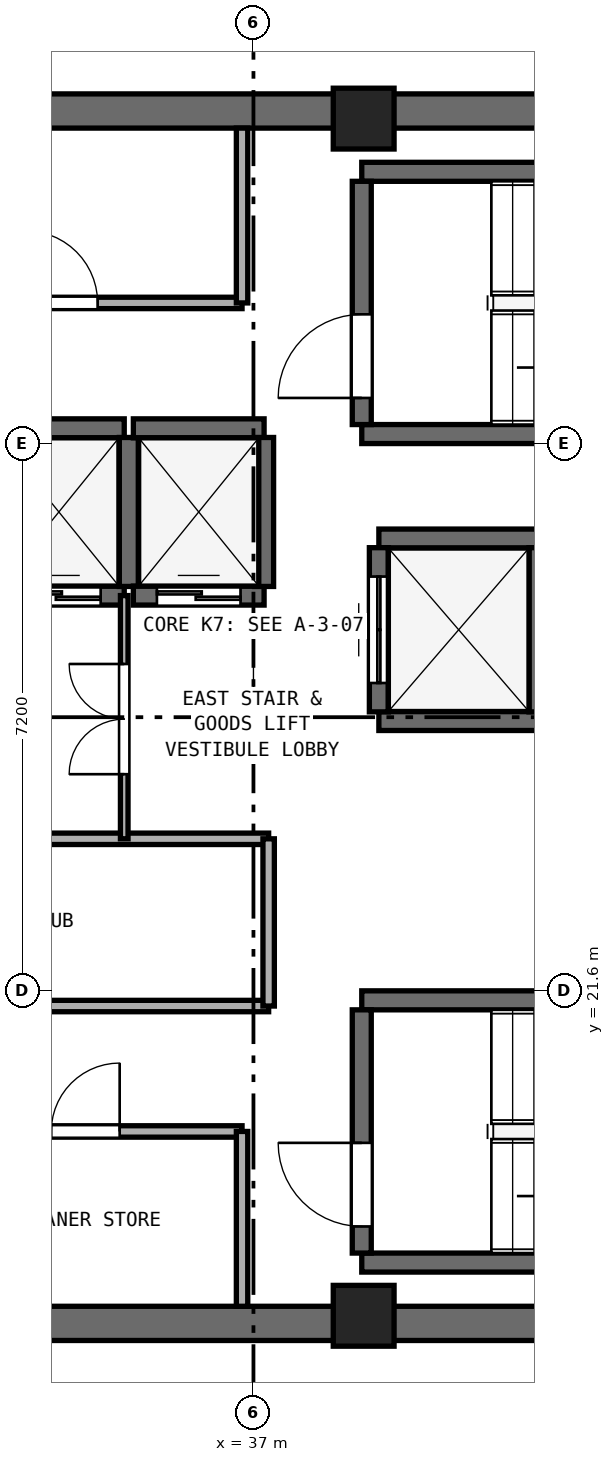
"""IFC4 building model, lengths in metres.
Left out: names, types, materials, properties, quantities, classifications, styles, units other than length and angle.
Written with IfcOpenShell. Run it as: python <this file> out.ifc"""

import sys

from ifc_helpers import new_model, si_unit, direction, frame, frame_2d, origin, origin_2d, place, context, subcontext, project, spatial, rectangle, extrude, element, fill, save


model = new_model("IFC4")
c1 = context("Model", 3, precision=1e-05, world=origin(), true_north=direction((0.0, 1.0)))
c2 = subcontext(c1, "Body", "Model", "MODEL_VIEW")
j1 = project(units=[si_unit("LENGTHUNIT", "METRE"), si_unit("PLANEANGLEUNIT", "RADIAN")], contexts=[c1])
p1 = place(None, origin())
s1 = spatial("IfcSite", under=j1, at=p1, CompositionType="ELEMENT")
p2 = place(p1, origin())
s2 = spatial("IfcBuilding", under=s1, at=p2, CompositionType="ELEMENT")
p3 = place(p2, frame((0.0, 0.0, 263.0)))
s3 = spatial("IfcBuildingStorey", under=s2, at=p3, CompositionType="ELEMENT", Elevation=263.0)
for number, where, z_axis, x_axis in (
    (1, (25.4, 17.225, 0.0), (0.0, 0.0, 1.0), (1.0, 0.0, 0.0)),
    (2, (25.4, 33.175, 0.0), (0.0, 0.0, 1.0), (1.0, 0.0, 0.0)),
):
    element("IfcWall", number, at=place(p3, frame(where, z_axis=z_axis, x_axis=x_axis)), inside=s3, PredefinedType="SHEAR", context=c2, shape_type="SweptSolid", body=[
        extrude(rectangle(XDim=23.2, YDim=0.45, at=frame_2d((11.6, 0.0))), origin(), (0.0, 0.0, 1.0), 3.51),
    ])
for number, where, z_axis, x_axis in (
    (3, (38.45, 17.325, 0.0), (0.0, 0.0, 1.0), (1.0, 0.0, 0.0)),
    (4, (38.45, 33.075, 0.0), (0.0, 0.0, 1.0), (1.0, 0.0, 0.0)),
):
    element("IfcColumn", number, at=place(p3, frame(where, z_axis=z_axis, x_axis=x_axis)), inside=s3, PredefinedType="PILASTER", context=c2, shape_type="SweptSolid", body=[
        extrude(rectangle(XDim=0.8, YDim=0.8, at=origin_2d()), origin(), (0.0, 0.0, 1.0), 3.8),
    ])
for number, where, z_axis, x_axis in (
    (5, (38.425, 28.925, 0.0), (0.0, 0.0, 1.0), (1.0, 0.0, 0.0)),
    (6, (38.425, 32.375, 0.0), (0.0, 0.0, 1.0), (1.0, 0.0, 0.0)),
):
    element("IfcWall", number, at=place(p3, frame(where, z_axis=z_axis, x_axis=x_axis)), inside=s3, PredefinedType="SHEAR", context=c2, shape_type="SweptSolid", body=[
        extrude(rectangle(XDim=7.3, YDim=0.25, at=frame_2d((3.65, 0.0))), origin(), (0.0, 0.0, 1.0), 3.51),
    ])
p4 = place(p3, frame((38.425, 29.05, 0.0), z_axis=(0.0, 0.0, 1.0), x_axis=(0.0, 1.0, 0.0)))
e7 = element("IfcWall", 7, at=p4, inside=s3, PredefinedType="SHEAR", context=c2, shape_type="SweptSolid", body=[
    extrude(rectangle(XDim=3.2, YDim=0.25, at=frame_2d((1.6, 0.0))), origin(), (0.0, 0.0, 1.0), 3.51),
])
p5 = place(p4, frame((0.35, 0.0, 0.0)))
e8 = element("IfcOpeningElement", 8, at=p5, cuts=e7, PredefinedType="OPENING", context=c2, shape_type="SweptSolid", body=[
    extrude(rectangle(XDim=1.1, YDim=2.15, at=frame_2d((0.55, 1.075))), frame((0.0, 0.135, 0.0), z_axis=(0.0, -1.0, 0.0), x_axis=(1.0, 0.0, 0.0)), (0.0, 0.0, 1.0), 0.27),
])
for number, where, z_axis, x_axis in (
    (9, (38.425, 18.025, 0.0), (0.0, 0.0, 1.0), (1.0, 0.0, 0.0)),
    (10, (38.425, 21.475, 0.0), (0.0, 0.0, 1.0), (1.0, 0.0, 0.0)),
):
    element("IfcWall", number, at=place(p3, frame(where, z_axis=z_axis, x_axis=x_axis)), inside=s3, PredefinedType="SHEAR", context=c2, shape_type="SweptSolid", body=[
        extrude(rectangle(XDim=7.3, YDim=0.25, at=frame_2d((3.65, 0.0))), origin(), (0.0, 0.0, 1.0), 3.51),
    ])
p6 = place(p3, frame((38.425, 18.15, 0.0), z_axis=(0.0, 0.0, 1.0), x_axis=(0.0, 1.0, 0.0)))
e11 = element("IfcWall", 11, at=p6, inside=s3, PredefinedType="SHEAR", context=c2, shape_type="SweptSolid", body=[
    extrude(rectangle(XDim=3.2, YDim=0.25, at=frame_2d((1.6, 0.0))), origin(), (0.0, 0.0, 1.0), 3.51),
])
p7 = place(p6, frame((0.35, 0.0, 0.0)))
e12 = element("IfcOpeningElement", 12, at=p7, cuts=e11, PredefinedType="OPENING", context=c2, shape_type="SweptSolid", body=[
    extrude(rectangle(XDim=1.1, YDim=2.15, at=frame_2d((0.55, 1.075))), frame((0.0, 0.135, 0.0), z_axis=(0.0, -1.0, 0.0), x_axis=(1.0, 0.0, 0.0)), (0.0, 0.0, 1.0), 0.27),
])
p8 = place(p3, frame((33.58, 26.8, 0.0), z_axis=(0.0, 0.0, 1.0), x_axis=(1.0, 0.0, 0.0)))
e13 = element("IfcWall", 13, at=p8, inside=s3, PredefinedType="SHEAR", context=c2, shape_type="SweptSolid", body=[
    extrude(rectangle(XDim=1.72, YDim=0.25, at=frame_2d((0.86, 0.0))), origin(), (0.0, 0.0, 1.0), 3.51),
])
p9 = place(p8, frame((0.31, 0.0, 0.0)))
e14 = element("IfcOpeningElement", 14, at=p9, cuts=e13, PredefinedType="OPENING", context=c2, shape_type="SweptSolid", body=[
    extrude(rectangle(XDim=1.1, YDim=2.15, at=frame_2d((0.55, 1.075))), frame((0.0, 0.135, 0.0), z_axis=(0.0, -1.0, 0.0), x_axis=(1.0, 0.0, 0.0)), (0.0, 0.0, 1.0), 0.27),
])
p10 = place(p3, frame((33.58, 29.0, 0.0), z_axis=(0.0, 0.0, 1.0), x_axis=(1.0, 0.0, 0.0)))
e15 = element("IfcWall", 15, at=p10, inside=s3, PredefinedType="SHEAR", context=c2, shape_type="SweptSolid", body=[
    extrude(rectangle(XDim=1.72, YDim=0.25, at=frame_2d((0.86, 0.0))), origin(), (0.0, 0.0, 1.0), 3.51),
])
p11 = place(p3, frame((35.36, 26.92, 0.0), z_axis=(0.0, 0.0, 1.0), x_axis=(0.0, 1.0, 0.0)))
e16 = element("IfcWall", 16, at=p11, inside=s3, PredefinedType="SHEAR", context=c2, shape_type="SweptSolid", body=[
    extrude(rectangle(XDim=1.96, YDim=0.25, at=frame_2d((0.98, 0.0))), origin(), (0.0, 0.0, 1.0), 3.51),
])
p12 = place(p3, frame((35.42, 26.8, 0.0), z_axis=(0.0, 0.0, 1.0), x_axis=(1.0, 0.0, 0.0)))
e17 = element("IfcWall", 17, at=p12, inside=s3, PredefinedType="SHEAR", context=c2, shape_type="SweptSolid", body=[
    extrude(rectangle(XDim=1.72, YDim=0.25, at=frame_2d((0.86, 0.0))), origin(), (0.0, 0.0, 1.0), 3.51),
])
p13 = place(p12, frame((0.31, 0.0, 0.0)))
e18 = element("IfcOpeningElement", 18, at=p13, cuts=e17, PredefinedType="OPENING", context=c2, shape_type="SweptSolid", body=[
    extrude(rectangle(XDim=1.1, YDim=2.15, at=frame_2d((0.55, 1.075))), frame((0.0, 0.135, 0.0), z_axis=(0.0, -1.0, 0.0), x_axis=(1.0, 0.0, 0.0)), (0.0, 0.0, 1.0), 0.27),
])
p14 = place(p3, frame((35.42, 29.0, 0.0), z_axis=(0.0, 0.0, 1.0), x_axis=(1.0, 0.0, 0.0)))
e19 = element("IfcWall", 19, at=p14, inside=s3, PredefinedType="SHEAR", context=c2, shape_type="SweptSolid", body=[
    extrude(rectangle(XDim=1.72, YDim=0.25, at=frame_2d((0.86, 0.0))), origin(), (0.0, 0.0, 1.0), 3.51),
])
p15 = place(p3, frame((37.14, 26.92, 0.0), z_axis=(0.0, 0.0, 1.0), x_axis=(0.0, 1.0, 0.0)))
e20 = element("IfcWall", 20, at=p15, inside=s3, PredefinedType="SHEAR", context=c2, shape_type="SweptSolid", body=[
    extrude(rectangle(XDim=1.96, YDim=0.25, at=frame_2d((0.98, 0.0))), origin(), (0.0, 0.0, 1.0), 3.51),
])
for number, where, z_axis, x_axis in (
    (21, (38.65, 25.15, 0.0), (0.0, 0.0, 1.0), (1.0, 0.0, 0.0)),
    (22, (38.65, 27.55, 0.0), (0.0, 0.0, 1.0), (1.0, 0.0, 0.0)),
):
    element("IfcWall", number, at=place(p3, frame(where, z_axis=z_axis, x_axis=x_axis)), inside=s3, PredefinedType="SHEAR", context=c2, shape_type="SweptSolid", body=[
        extrude(rectangle(XDim=2.1, YDim=0.25, at=frame_2d((1.05, 0.0))), origin(), (0.0, 0.0, 1.0), 3.51),
    ])
p16 = place(p3, frame((38.65, 25.27, 0.0), z_axis=(0.0, 0.0, 1.0), x_axis=(0.0, 1.0, 0.0)))
e23 = element("IfcWall", 23, at=p16, inside=s3, PredefinedType="SHEAR", context=c2, shape_type="SweptSolid", body=[
    extrude(rectangle(XDim=2.16, YDim=0.25, at=frame_2d((1.08, 0.0))), origin(), (0.0, 0.0, 1.0), 3.51),
])
p17 = place(p16, frame((0.38, 0.0, 0.0)))
e24 = element("IfcOpeningElement", 24, at=p17, cuts=e23, PredefinedType="OPENING", context=c2, shape_type="SweptSolid", body=[
    extrude(rectangle(XDim=1.4, YDim=2.2, at=frame_2d((0.7, 1.1))), frame((0.0, 0.135, 0.0), z_axis=(0.0, -1.0, 0.0), x_axis=(1.0, 0.0, 0.0)), (0.0, 0.0, 1.0), 0.27),
])
p18 = place(p3, frame((40.75, 25.27, 0.0), z_axis=(0.0, 0.0, 1.0), x_axis=(0.0, 1.0, 0.0)))
e25 = element("IfcWall", 25, at=p18, inside=s3, PredefinedType="SHEAR", context=c2, shape_type="SweptSolid", body=[
    extrude(rectangle(XDim=2.16, YDim=0.25, at=frame_2d((1.08, 0.0))), origin(), (0.0, 0.0, 1.0), 3.51),
])
p19 = place(p3, frame((32.1, 30.65, 0.0), z_axis=(0.0, 0.0, 1.0), x_axis=(1.0, 0.0, 0.0)))
e26 = element("IfcWall", 26, at=p19, inside=s3, PredefinedType="PARTITIONING", context=c2, shape_type="SweptSolid", body=[
    extrude(rectangle(XDim=4.75, YDim=0.15, at=frame_2d((2.375, 0.0))), origin(), (0.0, 0.0, 1.0), 3.51),
])
p20 = place(p19, frame((1.9, 0.0, 0.0)))
e27 = element("IfcOpeningElement", 27, at=p20, cuts=e26, PredefinedType="OPENING", context=c2, shape_type="SweptSolid", body=[
    extrude(rectangle(XDim=0.95, YDim=2.1, at=frame_2d((0.475, 1.05))), frame((0.0, 0.085, 0.0), z_axis=(0.0, -1.0, 0.0), x_axis=(1.0, 0.0, 0.0)), (0.0, 0.0, 1.0), 0.17),
])
p21 = place(p3, frame((36.85, 30.65, 0.0), z_axis=(0.0, 0.0, 1.0), x_axis=(0.0, 1.0, 0.0)))
e28 = element("IfcWall", 28, at=p21, inside=s3, PredefinedType="PARTITIONING", context=c2, shape_type="SweptSolid", body=[
    extrude(rectangle(XDim=2.3, YDim=0.15, at=frame_2d((1.15, 0.0))), origin(), (0.0, 0.0, 1.0), 3.51),
])
p22 = place(p3, frame((32.73, 19.75, 0.0), z_axis=(0.0, 0.0, 1.0), x_axis=(1.0, 0.0, 0.0)))
e29 = element("IfcWall", 29, at=p22, inside=s3, PredefinedType="PARTITIONING", context=c2, shape_type="SweptSolid", body=[
    extrude(rectangle(XDim=4.12, YDim=0.15, at=frame_2d((2.06, 0.0))), origin(), (0.0, 0.0, 1.0), 3.51),
])
p23 = place(p22, frame((1.61, 0.0, 0.0)))
e30 = element("IfcOpeningElement", 30, at=p23, cuts=e29, PredefinedType="OPENING", context=c2, shape_type="SweptSolid", body=[
    extrude(rectangle(XDim=0.9, YDim=2.1, at=frame_2d((0.45, 1.05))), frame((0.0, 0.085, 0.0), z_axis=(0.0, -1.0, 0.0), x_axis=(1.0, 0.0, 0.0)), (0.0, 0.0, 1.0), 0.17),
])
p24 = place(p3, frame((36.85, 17.45, 0.0), z_axis=(0.0, 0.0, 1.0), x_axis=(0.0, 1.0, 0.0)))
e31 = element("IfcWall", 31, at=p24, inside=s3, PredefinedType="PARTITIONING", context=c2, shape_type="SweptSolid", body=[
    extrude(rectangle(XDim=2.3, YDim=0.15, at=frame_2d((1.15, 0.0))), origin(), (0.0, 0.0, 1.0), 3.51),
])
p25 = place(p3, frame((30.08, 21.4, 0.0), z_axis=(0.0, 0.0, 1.0), x_axis=(1.0, 0.0, 0.0)))
e32 = element("IfcWall", 32, at=p25, inside=s3, PredefinedType="PARTITIONING", context=c2, shape_type="SweptSolid", body=[
    extrude(rectangle(XDim=7.12, YDim=0.15, at=frame_2d((3.56, 0.0))), origin(), (0.0, 0.0, 1.0), 3.51),
])
p26 = place(p3, frame((30.08, 23.6, 0.0), z_axis=(0.0, 0.0, 1.0), x_axis=(1.0, 0.0, 0.0)))
e33 = element("IfcWall", 33, at=p26, inside=s3, PredefinedType="PARTITIONING", context=c2, shape_type="SweptSolid", body=[
    extrude(rectangle(XDim=7.12, YDim=0.15, at=frame_2d((3.56, 0.0))), origin(), (0.0, 0.0, 1.0), 3.51),
])
p27 = place(p26, frame((3.11, 0.0, 0.0)))
e34 = element("IfcOpeningElement", 34, at=p27, cuts=e33, PredefinedType="OPENING", context=c2, shape_type="SweptSolid", body=[
    extrude(rectangle(XDim=0.9, YDim=2.1, at=frame_2d((0.45, 1.05))), frame((0.0, 0.085, 0.0), z_axis=(0.0, -1.0, 0.0), x_axis=(1.0, 0.0, 0.0)), (0.0, 0.0, 1.0), 0.17),
])
p28 = place(p3, frame((37.2, 21.4, 0.0), z_axis=(0.0, 0.0, 1.0), x_axis=(0.0, 1.0, 0.0)))
e35 = element("IfcWall", 35, at=p28, inside=s3, PredefinedType="PARTITIONING", context=c2, shape_type="SweptSolid", body=[
    extrude(rectangle(XDim=2.2, YDim=0.15, at=frame_2d((1.1, 0.0))), origin(), (0.0, 0.0, 1.0), 3.51),
])
p29 = place(p3, frame((35.3, 23.6, 0.0), z_axis=(0.0, 0.0, 1.0), x_axis=(0.0, 1.0, 0.0)))
e36 = element("IfcWall", 36, at=p29, inside=s3, PredefinedType="PARTITIONING", context=c2, shape_type="SweptSolid", body=[
    extrude(rectangle(XDim=3.2, YDim=0.1, at=frame_2d((1.6, 0.0))), origin(), (0.0, 0.0, 1.0), 3.51),
])
p30 = place(p29, frame((0.85, 0.0, 0.0)))
e37 = element("IfcOpeningElement", 37, at=p30, cuts=e36, PredefinedType="OPENING", context=c2, shape_type="SweptSolid", body=[
    extrude(rectangle(XDim=1.45, YDim=2.12, at=frame_2d((0.725, 1.06))), frame((0.0, 0.06, 0.0), z_axis=(0.0, -1.0, 0.0), x_axis=(1.0, 0.0, 0.0)), (0.0, 0.0, 1.0), 0.12),
])
p31 = place(p5, origin())
e38 = element("IfcDoor", 38, at=p31, inside=s3, OperationType="SINGLE_SWING_LEFT", PredefinedType="DOOR", context=c2, shape_type="SweptSolid", body=[
    extrude(rectangle(XDim=1.1, YDim=2.15, at=frame_2d((0.55, 1.075))), frame((0.0, 0.025, 0.0), z_axis=(0.0, -1.0, 0.0), x_axis=(1.0, 0.0, 0.0)), (0.0, 0.0, 1.0), 0.05),
])
fill(e8, e38)
p32 = place(p7, origin())
e39 = element("IfcDoor", 39, at=p32, inside=s3, OperationType="SINGLE_SWING_RIGHT", PredefinedType="DOOR", context=c2, shape_type="SweptSolid", body=[
    extrude(rectangle(XDim=1.1, YDim=2.15, at=frame_2d((0.55, 1.075))), frame((0.0, 0.025, 0.0), z_axis=(0.0, -1.0, 0.0), x_axis=(1.0, 0.0, 0.0)), (0.0, 0.0, 1.0), 0.05),
])
fill(e12, e39)
p33 = place(p9, origin())
e40 = element("IfcDoor", 40, at=p33, inside=s3, OperationType="DOUBLE_DOOR_SLIDING", PredefinedType="DOOR", context=c2, shape_type="SweptSolid", body=[
    extrude(rectangle(XDim=1.1, YDim=2.15, at=frame_2d((0.55, 1.075))), frame((0.0, 0.025, 0.0), z_axis=(0.0, -1.0, 0.0), x_axis=(1.0, 0.0, 0.0)), (0.0, 0.0, 1.0), 0.05),
])
fill(e14, e40)
p34 = place(p13, origin())
e41 = element("IfcDoor", 41, at=p34, inside=s3, OperationType="DOUBLE_DOOR_SLIDING", PredefinedType="DOOR", context=c2, shape_type="SweptSolid", body=[
    extrude(rectangle(XDim=1.1, YDim=2.15, at=frame_2d((0.55, 1.075))), frame((0.0, 0.025, 0.0), z_axis=(0.0, -1.0, 0.0), x_axis=(1.0, 0.0, 0.0)), (0.0, 0.0, 1.0), 0.05),
])
fill(e18, e41)
p35 = place(p17, origin())
e42 = element("IfcDoor", 42, at=p35, inside=s3, OperationType="DOUBLE_DOOR_SLIDING", PredefinedType="DOOR", context=c2, shape_type="SweptSolid", body=[
    extrude(rectangle(XDim=1.4, YDim=2.2, at=frame_2d((0.7, 1.1))), frame((0.0, 0.025, 0.0), z_axis=(0.0, -1.0, 0.0), x_axis=(1.0, 0.0, 0.0)), (0.0, 0.0, 1.0), 0.05),
])
fill(e24, e42)
p36 = place(p20, origin())
e43 = element("IfcDoor", 43, at=p36, inside=s3, OperationType="SINGLE_SWING_LEFT", PredefinedType="DOOR", context=c2, shape_type="SweptSolid", body=[
    extrude(rectangle(XDim=0.95, YDim=2.1, at=frame_2d((0.475, 1.05))), frame((0.0, 0.025, 0.0), z_axis=(0.0, -1.0, 0.0), x_axis=(1.0, 0.0, 0.0)), (0.0, 0.0, 1.0), 0.05),
])
fill(e27, e43)
p37 = place(p23, origin())
e44 = element("IfcDoor", 44, at=p37, inside=s3, OperationType="SINGLE_SWING_RIGHT", PredefinedType="DOOR", context=c2, shape_type="SweptSolid", body=[
    extrude(rectangle(XDim=0.9, YDim=2.1, at=frame_2d((0.45, 1.05))), frame((0.0, 0.025, 0.0), z_axis=(0.0, -1.0, 0.0), x_axis=(1.0, 0.0, 0.0)), (0.0, 0.0, 1.0), 0.05),
])
fill(e30, e44)
p38 = place(p30, origin())
e45 = element("IfcDoor", 45, at=p38, inside=s3, OperationType="DOUBLE_DOOR_SINGLE_SWING", PredefinedType="DOOR", context=c2, shape_type="SweptSolid", body=[
    extrude(rectangle(XDim=1.45, YDim=2.12, at=frame_2d((0.725, 1.06))), frame((0.0, 0.025, 0.0), z_axis=(0.0, -1.0, 0.0), x_axis=(1.0, 0.0, 0.0)), (0.0, 0.0, 1.0), 0.05),
])
fill(e37, e45)
save(model, sys.argv[1])
